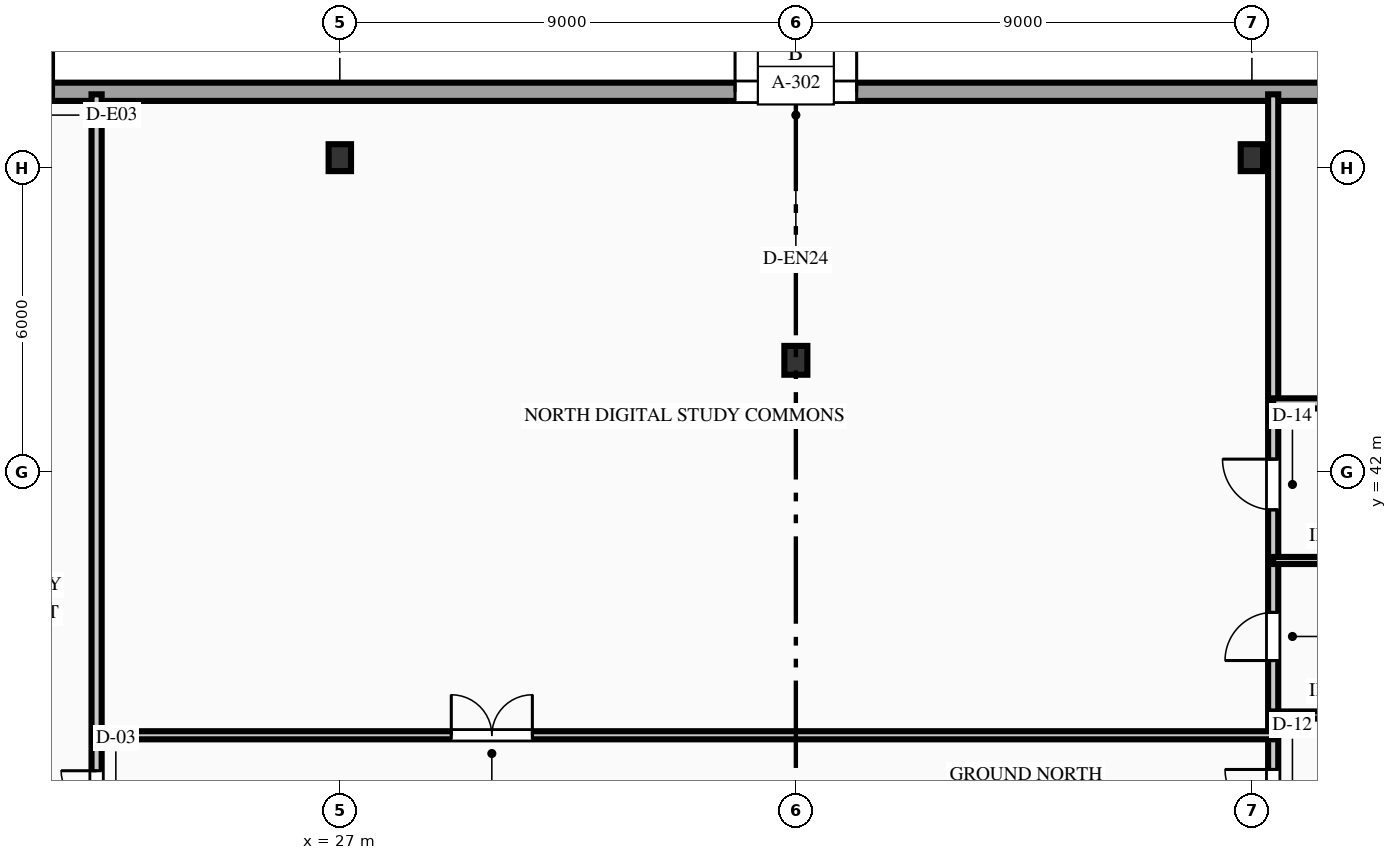
"""IFC4 building model, lengths in metres.
Left out: names, types, materials, properties, quantities, classifications, styles, units other than length and angle.
Written with IfcOpenShell. Run it as: python <this file> out.ifc"""

import sys

from ifc_helpers import new_model, si_unit, direction, frame, frame_2d, origin, origin_2d, place, context, subcontext, project, spatial, rectangle, i_section, extrude, element, fill, save


model = new_model("IFC4")
c1 = context("Model", 3, precision=1e-05, world=origin(), true_north=direction((0.0, 1.0)))
c2 = subcontext(c1, "Body", "Model", "MODEL_VIEW")
j1 = project(units=[si_unit("LENGTHUNIT", "METRE"), si_unit("PLANEANGLEUNIT", "RADIAN")], contexts=[c1])
p1 = place(None, origin())
s1 = spatial("IfcSite", under=j1, at=p1, CompositionType="ELEMENT")
p2 = place(p1, origin())
s2 = spatial("IfcBuilding", under=s1, at=p2, CompositionType="ELEMENT")
p3 = place(p2, origin())
s3 = spatial("IfcBuildingStorey", under=s2, at=p3, CompositionType="ELEMENT", Elevation=0.0)
p4 = place(p3, frame((36.0, 44.2, 0.0), z_axis=(0.0, 0.0, 1.0), x_axis=(1.0, 0.0, 0.0)))
e1 = element("IfcColumn", 1, at=p4, inside=s3, PredefinedType="COLUMN", context=c2, shape_type="SweptSolid", body=[
    extrude(i_section(OverallWidth=0.454, OverallDepth=0.569, WebThickness=0.078, FlangeThickness=0.125, at=origin_2d()), origin(), (0.0, 0.0, 1.0), 6.0),
])
for number, where, z_axis, x_axis in (
    (2, (45.0, 48.2, 0.0), (0.0, 0.0, 1.0), (1.0, 0.0, 0.0)),
    (3, (27.0, 48.2, 0.0), (0.0, 0.0, 1.0), (1.0, 0.0, 0.0)),
):
    element("IfcColumn", number, at=place(p3, frame(where, z_axis=z_axis, x_axis=x_axis)), inside=s3, PredefinedType="PILASTER", context=c2, shape_type="SweptSolid", body=[
        extrude(i_section(OverallWidth=0.442, OverallDepth=0.531, WebThickness=0.066, FlangeThickness=0.106, at=origin_2d()), origin(), (0.0, 0.0, 1.0), 6.0),
    ])
p5 = place(p3, frame((8.0, 49.5, 0.0), z_axis=(0.0, 0.0, 1.0), x_axis=(1.0, 0.0, 0.0)))
e4 = element("IfcWall", 4, at=p5, inside=s3, PredefinedType="STANDARD", context=c2, shape_type="SweptSolid", body=[
    extrude(rectangle(XDim=56.0, YDim=0.36, at=frame_2d((28.0, 0.0))), origin(), (0.0, 0.0, 1.0), 5.67),
])
p6 = place(p5, frame((11.15, 0.0, 0.0)))
e5 = element("IfcOpeningElement", 5, at=p6, cuts=e4, PredefinedType="OPENING", context=c2, shape_type="SweptSolid", body=[
    extrude(rectangle(XDim=2.2, YDim=2.4, at=frame_2d((1.1, 1.2))), frame((0.0, 0.19, 0.0), z_axis=(0.0, -1.0, 0.0), x_axis=(1.0, 0.0, 0.0)), (0.0, 0.0, 1.0), 0.38),
])
p7 = place(p5, frame((42.65, 0.0, 0.0)))
e6 = element("IfcOpeningElement", 6, at=p7, cuts=e4, PredefinedType="OPENING", context=c2, shape_type="SweptSolid", body=[
    extrude(rectangle(XDim=2.2, YDim=2.4, at=frame_2d((1.1, 1.2))), frame((0.0, 0.19, 0.0), z_axis=(0.0, -1.0, 0.0), x_axis=(1.0, 0.0, 0.0)), (0.0, 0.0, 1.0), 0.38),
])
p8 = place(p5, frame((26.8, 0.0, 0.0)))
e7 = element("IfcOpeningElement", 7, at=p8, cuts=e4, PredefinedType="OPENING", context=c2, shape_type="SweptSolid", body=[
    extrude(rectangle(XDim=2.4, YDim=2.6, at=frame_2d((1.2, 1.3))), frame((0.0, 0.19, 0.0), z_axis=(0.0, -1.0, 0.0), x_axis=(1.0, 0.0, 0.0)), (0.0, 0.0, 1.0), 0.38),
])
p9 = place(p5, frame((50.55, 0.0, 0.0)))
e8 = element("IfcOpeningElement", 8, at=p9, cuts=e4, PredefinedType="OPENING", context=c2, shape_type="SweptSolid", body=[
    extrude(rectangle(XDim=1.1, YDim=2.2, at=frame_2d((0.55, 1.1))), frame((0.0, 0.19, 0.0), z_axis=(0.0, -1.0, 0.0), x_axis=(1.0, 0.0, 0.0)), (0.0, 0.0, 1.0), 0.38),
])
p10 = place(p3, frame((22.2, 30.08, 0.0), z_axis=(0.0, 0.0, 1.0), x_axis=(0.0, 1.0, 0.0)))
e9 = element("IfcWall", 9, at=p10, inside=s3, PredefinedType="PARTITIONING", context=c2, shape_type="SweptSolid", body=[
    extrude(rectangle(XDim=19.37, YDim=0.2, at=frame_2d((9.685, 0.0))), origin(), (0.0, 0.0, 1.0), 5.67),
])
p11 = place(p10, frame((4.62, 0.0, 0.0)))
e10 = element("IfcOpeningElement", 10, at=p11, cuts=e9, PredefinedType="OPENING", context=c2, shape_type="SweptSolid", body=[
    extrude(rectangle(XDim=1.4, YDim=2.2, at=frame_2d((0.7, 1.1))), frame((0.0, 0.11, 0.0), z_axis=(0.0, -1.0, 0.0), x_axis=(1.0, 0.0, 0.0)), (0.0, 0.0, 1.0), 0.22),
])
p12 = place(p3, frame((45.42, 34.25, 0.0), z_axis=(0.0, 0.0, 1.0), x_axis=(0.0, 1.0, 0.0)))
e11 = element("IfcWall", 11, at=p12, inside=s3, PredefinedType="PARTITIONING", context=c2, shape_type="SweptSolid", body=[
    extrude(rectangle(XDim=15.2, YDim=0.2, at=frame_2d((7.6, 0.0))), origin(), (0.0, 0.0, 1.0), 4.803),
])
p13 = place(p12, frame((0.925, 0.0, 0.0)))
e12 = element("IfcOpeningElement", 12, at=p13, cuts=e11, PredefinedType="OPENING", context=c2, shape_type="SweptSolid", body=[
    extrude(rectangle(XDim=0.95, YDim=2.15, at=frame_2d((0.475, 1.075))), frame((0.0, 0.11, 0.0), z_axis=(0.0, -1.0, 0.0), x_axis=(1.0, 0.0, 0.0)), (0.0, 0.0, 1.0), 0.22),
])
p14 = place(p12, frame((4.025, 0.0, 0.0)))
e13 = element("IfcOpeningElement", 13, at=p14, cuts=e11, PredefinedType="OPENING", context=c2, shape_type="SweptSolid", body=[
    extrude(rectangle(XDim=0.95, YDim=2.15, at=frame_2d((0.475, 1.075))), frame((0.0, 0.11, 0.0), z_axis=(0.0, -1.0, 0.0), x_axis=(1.0, 0.0, 0.0)), (0.0, 0.0, 1.0), 0.22),
])
p15 = place(p12, frame((7.0, 0.0, 0.0)))
e14 = element("IfcOpeningElement", 14, at=p15, cuts=e11, PredefinedType="OPENING", context=c2, shape_type="SweptSolid", body=[
    extrude(rectangle(XDim=1.0, YDim=2.15, at=frame_2d((0.5, 1.075))), frame((0.0, 0.11, 0.0), z_axis=(0.0, -1.0, 0.0), x_axis=(1.0, 0.0, 0.0)), (0.0, 0.0, 1.0), 0.22),
])
p16 = place(p3, frame((45.42, 43.35, 0.0), z_axis=(0.0, 0.0, 1.0), x_axis=(1.0, 0.0, 0.0)))
e15 = element("IfcWall", 15, at=p16, inside=s3, PredefinedType="PARTITIONING", context=c2, shape_type="SweptSolid", body=[
    extrude(rectangle(XDim=4.38, YDim=0.2, at=frame_2d((2.19, 0.0))), origin(), (0.0, 0.0, 1.0), 5.67),
])
for number, where, z_axis, x_axis in (
    (16, (45.42, 37.2, 0.0), (0.0, 0.0, 1.0), (1.0, 0.0, 0.0)),
    (17, (45.42, 40.25, 0.0), (0.0, 0.0, 1.0), (1.0, 0.0, 0.0)),
):
    element("IfcWall", number, at=place(p3, frame(where, z_axis=z_axis, x_axis=x_axis)), inside=s3, PredefinedType="PARTITIONING", context=c2, shape_type="SweptSolid", body=[
        extrude(rectangle(XDim=4.38, YDim=0.14, at=frame_2d((2.19, 0.0))), origin(), (0.0, 0.0, 1.0), 5.67),
    ])
p17 = place(p3, frame((22.2, 36.8, 0.0), z_axis=(0.0, 0.0, 1.0), x_axis=(1.0, 0.0, 0.0)))
e18 = element("IfcWall", 18, at=p17, inside=s3, PredefinedType="PARTITIONING", context=c2, shape_type="SweptSolid", body=[
    extrude(rectangle(XDim=23.22, YDim=0.16, at=frame_2d((11.61, 0.0))), origin(), (0.0, 0.0, 1.0), 5.67),
])
p18 = place(p17, frame((7.0, 0.0, 0.0)))
e19 = element("IfcOpeningElement", 19, at=p18, cuts=e18, PredefinedType="OPENING", context=c2, shape_type="SweptSolid", body=[
    extrude(rectangle(XDim=1.6, YDim=2.2, at=frame_2d((0.8, 1.1))), frame((0.0, 0.09, 0.0), z_axis=(0.0, -1.0, 0.0), x_axis=(1.0, 0.0, 0.0)), (0.0, 0.0, 1.0), 0.18),
])
p19 = place(p6, origin())
e20 = element("IfcDoor", 20, at=p19, inside=s3, OperationType="DOUBLE_DOOR_SINGLE_SWING", PredefinedType="DOOR", context=c2, shape_type="SweptSolid", body=[
    extrude(rectangle(XDim=2.2, YDim=2.4, at=frame_2d((1.1, 1.2))), frame((0.0, 0.025, 0.0), z_axis=(0.0, -1.0, 0.0), x_axis=(1.0, 0.0, 0.0)), (0.0, 0.0, 1.0), 0.05),
])
fill(e5, e20)
p20 = place(p8, origin())
e21 = element("IfcDoor", 21, at=p20, inside=s3, OperationType="DOUBLE_DOOR_SINGLE_SWING", PredefinedType="DOOR", context=c2, shape_type="SweptSolid", body=[
    extrude(rectangle(XDim=2.4, YDim=2.6, at=frame_2d((1.2, 1.3))), frame((0.0, 0.025, 0.0), z_axis=(0.0, -1.0, 0.0), x_axis=(1.0, 0.0, 0.0)), (0.0, 0.0, 1.0), 0.05),
])
fill(e7, e21)
p21 = place(p11, origin())
e22 = element("IfcDoor", 22, at=p21, inside=s3, OperationType="DOUBLE_DOOR_SINGLE_SWING", PredefinedType="DOOR", context=c2, shape_type="SweptSolid", body=[
    extrude(rectangle(XDim=1.4, YDim=2.2, at=frame_2d((0.7, 1.1))), frame((0.0, 0.025, 0.0), z_axis=(0.0, -1.0, 0.0), x_axis=(1.0, 0.0, 0.0)), (0.0, 0.0, 1.0), 0.05),
])
fill(e10, e22)
p22 = place(p13, origin())
e23 = element("IfcDoor", 23, at=p22, inside=s3, OperationType="SINGLE_SWING_RIGHT", PredefinedType="DOOR", context=c2, shape_type="SweptSolid", body=[
    extrude(rectangle(XDim=0.95, YDim=2.15, at=frame_2d((0.475, 1.075))), frame((0.0, 0.025, 0.0), z_axis=(0.0, -1.0, 0.0), x_axis=(1.0, 0.0, 0.0)), (0.0, 0.0, 1.0), 0.05),
])
fill(e12, e23)
p23 = place(p14, origin())
e24 = element("IfcDoor", 24, at=p23, inside=s3, OperationType="SINGLE_SWING_LEFT", PredefinedType="DOOR", context=c2, shape_type="SweptSolid", body=[
    extrude(rectangle(XDim=0.95, YDim=2.15, at=frame_2d((0.475, 1.075))), frame((0.0, 0.025, 0.0), z_axis=(0.0, -1.0, 0.0), x_axis=(1.0, 0.0, 0.0)), (0.0, 0.0, 1.0), 0.05),
])
fill(e13, e24)
p24 = place(p15, origin())
e25 = element("IfcDoor", 25, at=p24, inside=s3, OperationType="SINGLE_SWING_RIGHT", PredefinedType="DOOR", context=c2, shape_type="SweptSolid", body=[
    extrude(rectangle(XDim=1.0, YDim=2.15, at=frame_2d((0.5, 1.075))), frame((0.0, 0.025, 0.0), z_axis=(0.0, -1.0, 0.0), x_axis=(1.0, 0.0, 0.0)), (0.0, 0.0, 1.0), 0.05),
])
fill(e14, e25)
p25 = place(p18, origin())
e26 = element("IfcDoor", 26, at=p25, inside=s3, OperationType="DOUBLE_DOOR_SINGLE_SWING", PredefinedType="DOOR", context=c2, shape_type="SweptSolid", body=[
    extrude(rectangle(XDim=1.6, YDim=2.2, at=frame_2d((0.8, 1.1))), frame((0.0, 0.025, 0.0), z_axis=(0.0, -1.0, 0.0), x_axis=(1.0, 0.0, 0.0)), (0.0, 0.0, 1.0), 0.05),
])
fill(e19, e26)
save(model, sys.argv[1])
